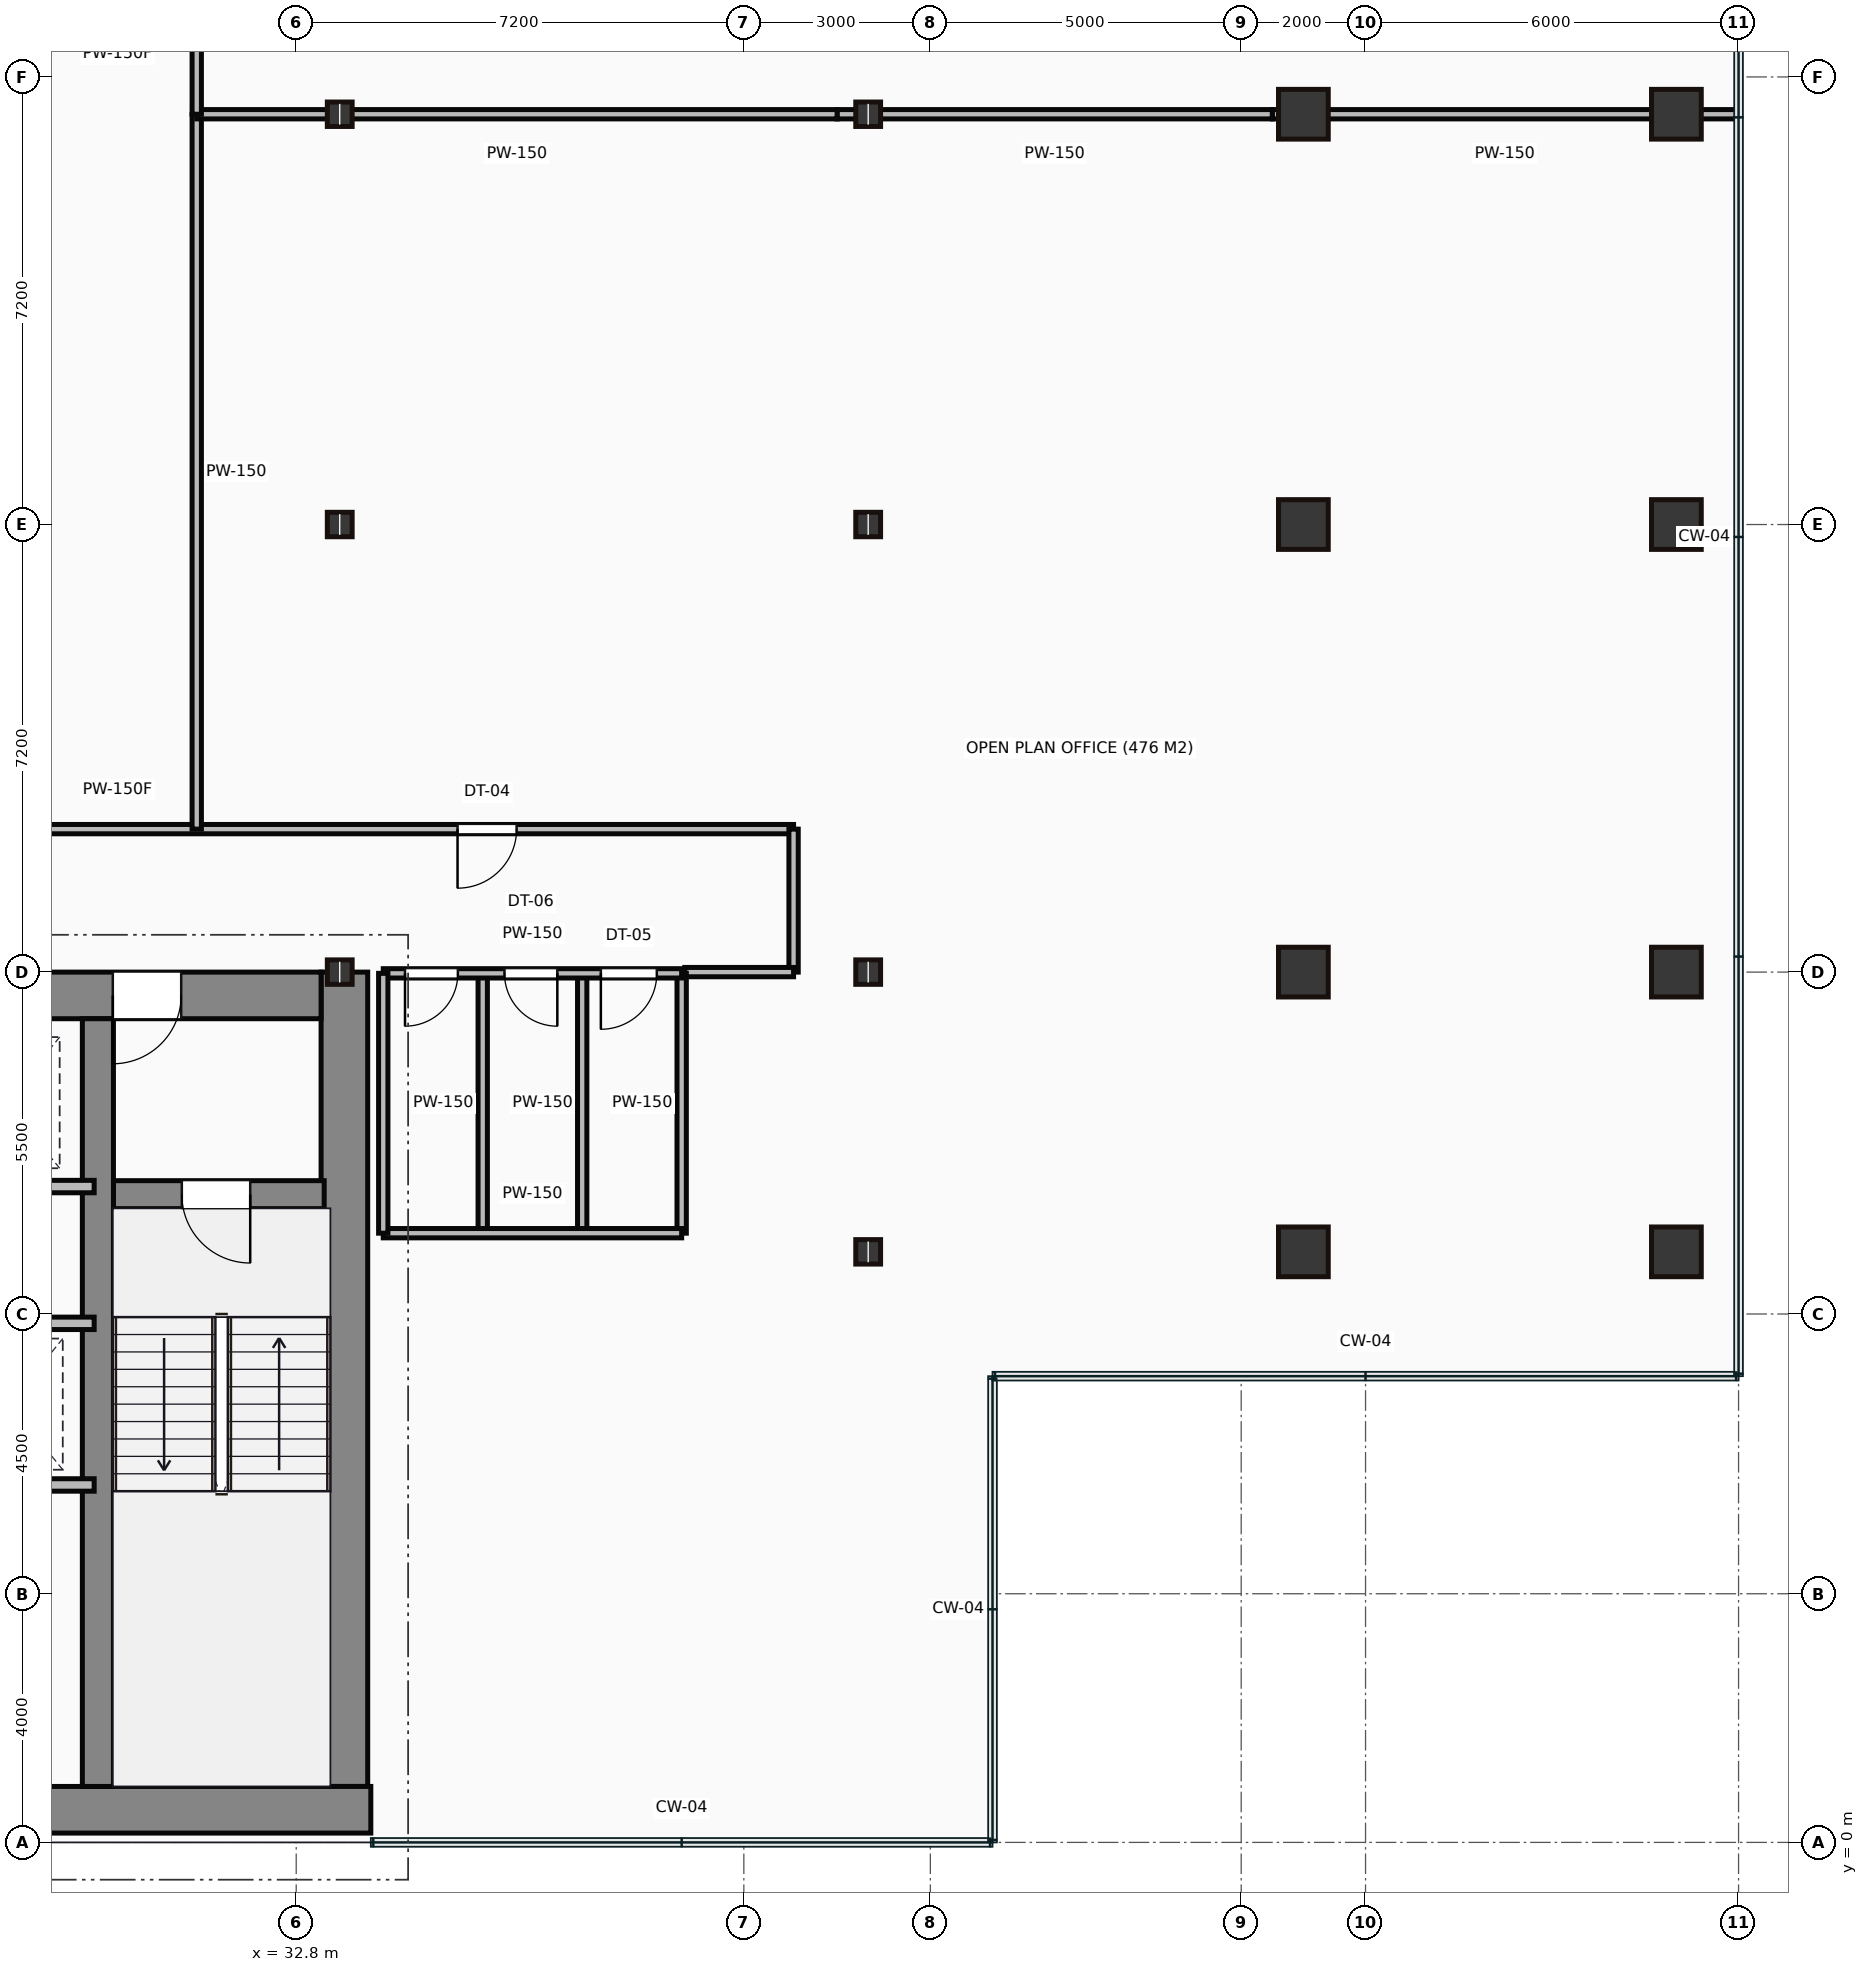
"""IFC4 building model, lengths in metres.
Left out: names, types, materials, properties, quantities, classifications, styles, units other than length and angle.
Written with IfcOpenShell. Run it as: python <this file> out.ifc"""

import sys

from ifc_helpers import new_model, si_unit, direction, frame, frame_2d, origin, origin_2d, place, context, subcontext, project, spatial, rectangle, hollow_rectangle, i_section, extrude, source, transform, mapped, element, fill, save


model = new_model("IFC4")
c1 = context("Model", 3, precision=1e-05, world=origin(), true_north=direction((0.0, 1.0)))
c2 = subcontext(c1, "Body", "Model", "MODEL_VIEW")
j1 = project(units=[si_unit("LENGTHUNIT", "METRE"), si_unit("PLANEANGLEUNIT", "RADIAN")], contexts=[c1])
p1 = place(None, origin())
s1 = spatial("IfcSite", under=j1, at=p1, CompositionType="ELEMENT")
p2 = place(p1, origin())
s2 = spatial("IfcBuilding", under=s1, at=p2, CompositionType="ELEMENT")
p3 = place(p2, frame((0.0, 0.0, 128.8)))
s3 = spatial("IfcBuildingStorey", under=s2, at=p3, CompositionType="ELEMENT", Elevation=128.8)
m1 = source(origin(), c2, "Body", "SweptSolid", [
    extrude(rectangle(XDim=29.5, YDim=0.75, at=frame_2d((14.75, 0.0))), origin(), (0.0, 0.0, 1.0), 3.65),
])
p4 = place(p3, frame((4.5, 0.525, 0.0), z_axis=(0.0, 0.0, 1.0), x_axis=(1.0, 0.0, 0.0)))
e1 = element("IfcWall", 1, at=p4, inside=s3, PredefinedType="SHEAR", context=c2, shape_type="MappedRepresentation", body=[
    mapped(m1, transform((0.0, 0.0, 0.0))),
])
m2 = source(origin(), c2, "Body", "SweptSolid", [
    extrude(rectangle(XDim=13.1, YDim=0.75, at=frame_2d((6.55, 0.0))), origin(), (0.0, 0.0, 1.0), 3.65),
])
p5 = place(p3, frame((33.575, 0.9, 0.0), z_axis=(0.0, 0.0, 1.0), x_axis=(0.0, 1.0, 0.0)))
e2 = element("IfcWall", 2, at=p5, inside=s3, PredefinedType="SHEAR", context=c2, shape_type="MappedRepresentation", body=[
    mapped(m2, transform((0.0, 0.0, 0.0))),
])
m3 = source(origin(), c2, "Body", "SweptSolid", [
    extrude(rectangle(XDim=12.6, YDim=0.75, at=frame_2d((6.3, 0.0))), origin(), (0.0, 0.0, 1.0), 3.65),
])
p6 = place(p3, frame((20.6, 13.625, 0.0), z_axis=(0.0, 0.0, 1.0), x_axis=(1.0, 0.0, 0.0)))
e3 = element("IfcWall", 3, at=p6, inside=s3, PredefinedType="SHEAR", context=c2, shape_type="MappedRepresentation", body=[
    mapped(m3, transform((0.0, 0.0, 0.0))),
])
p7 = place(p6, frame((9.25, 0.0, 0.0)))
e4 = element("IfcOpeningElement", 4, at=p7, cuts=e3, PredefinedType="OPENING", context=c2, shape_type="SweptSolid", body=[
    extrude(rectangle(XDim=1.1, YDim=2.15, at=frame_2d((0.55, 1.075))), frame((0.0, 0.385, 0.0), z_axis=(0.0, -1.0, 0.0), x_axis=(1.0, 0.0, 0.0)), (0.0, 0.0, 1.0), 0.77),
])
m4 = source(origin(), c2, "Body", "SweptSolid", [
    extrude(rectangle(XDim=12.35, YDim=0.5, at=frame_2d((6.175, 0.0))), origin(), (0.0, 0.0, 1.0), 3.65),
])
p8 = place(p3, frame((29.61, 0.9, 0.0), z_axis=(0.0, 0.0, 1.0), x_axis=(0.0, 1.0, 0.0)))
e5 = element("IfcWall", 5, at=p8, inside=s3, PredefinedType="SHEAR", context=c2, shape_type="MappedRepresentation", body=[
    mapped(m4, transform((0.0, 0.0, 0.0))),
])
m5 = source(origin(), c2, "Body", "SweptSolid", [
    extrude(rectangle(XDim=3.39, YDim=0.45, at=frame_2d((1.695, 0.0))), origin(), (0.0, 0.0, 1.0), 3.65),
])
p9 = place(p3, frame((29.86, 10.42, 0.0), z_axis=(0.0, 0.0, 1.0), x_axis=(1.0, 0.0, 0.0)))
e6 = element("IfcWall", 6, at=p9, inside=s3, PredefinedType="SHEAR", context=c2, shape_type="MappedRepresentation", body=[
    mapped(m5, transform((0.0, 0.0, 0.0))),
])
p10 = place(p9, frame((1.1, 0.0, 0.0)))
e7 = element("IfcOpeningElement", 7, at=p10, cuts=e6, PredefinedType="OPENING", context=c2, shape_type="SweptSolid", body=[
    extrude(rectangle(XDim=1.1, YDim=2.15, at=frame_2d((0.55, 1.075))), frame((0.0, 0.235, 0.0), z_axis=(0.0, -1.0, 0.0), x_axis=(1.0, 0.0, 0.0)), (0.0, 0.0, 1.0), 0.47),
])
m6 = source(origin(), c2, "Body", "SweptSolid", [
    extrude(i_section(OverallWidth=0.399, OverallDepth=0.393, WebThickness=0.023, FlangeThickness=0.037, at=origin_2d()), origin(), (0.0, 0.0, 1.0), 3.65),
])
for number, where, z_axis, x_axis in (
    (8, (33.5, 14.0, 0.0), (0.0, 0.0, 1.0), (1.0, 0.0, 0.0)),
    (9, (33.5, 21.2, 0.0), (0.0, 0.0, 1.0), (1.0, 0.0, 0.0)),
    (10, (33.5, 27.8, 0.0), (0.0, 0.0, 1.0), (1.0, 0.0, 0.0)),
    (11, (42.0, 9.5, 0.0), (0.0, 0.0, 1.0), (1.0, 0.0, 0.0)),
    (12, (42.0, 14.0, 0.0), (0.0, 0.0, 1.0), (1.0, 0.0, 0.0)),
    (13, (42.0, 21.2, 0.0), (0.0, 0.0, 1.0), (1.0, 0.0, 0.0)),
    (14, (42.0, 27.8, 0.0), (0.0, 0.0, 1.0), (1.0, 0.0, 0.0)),
):
    element("IfcColumn", number, at=place(p3, frame(where, z_axis=z_axis, x_axis=x_axis)), inside=s3, PredefinedType="COLUMN", context=c2, shape_type="MappedRepresentation", body=[
        mapped(m6, transform((0.0, 0.0, 0.0))),
    ])
m7 = source(origin(), c2, "Body", "SweptSolid", [
    extrude(hollow_rectangle(XDim=0.8, YDim=0.8, WallThickness=0.04, at=origin_2d()), origin(), (0.0, 0.0, 1.0), 3.65),
])
for number, where, z_axis, x_axis in (
    (15, (49.0, 9.5, 0.0), (0.0, 0.0, 1.0), (1.0, 0.0, 0.0)),
    (16, (49.0, 14.0, 0.0), (0.0, 0.0, 1.0), (1.0, 0.0, 0.0)),
    (17, (49.0, 21.2, 0.0), (0.0, 0.0, 1.0), (1.0, 0.0, 0.0)),
    (18, (49.0, 27.8, 0.0), (0.0, 0.0, 1.0), (1.0, 0.0, 0.0)),
    (19, (55.0, 9.5, 0.0), (0.0, 0.0, 1.0), (1.0, 0.0, 0.0)),
    (20, (55.0, 14.0, 0.0), (0.0, 0.0, 1.0), (1.0, 0.0, 0.0)),
    (21, (55.0, 21.2, 0.0), (0.0, 0.0, 1.0), (1.0, 0.0, 0.0)),
    (22, (55.0, 27.8, 0.0), (0.0, 0.0, 1.0), (1.0, 0.0, 0.0)),
):
    element("IfcColumn", number, at=place(p3, frame(where, z_axis=z_axis, x_axis=x_axis)), inside=s3, PredefinedType="COLUMN", context=c2, shape_type="MappedRepresentation", body=[
        mapped(m7, transform((0.0, 0.0, 0.0))),
    ])
m8 = source(origin(), c2, "Body", "SweptSolid", [
    extrude(rectangle(XDim=8.8, YDim=0.2, at=frame_2d((4.4, 0.0))), origin(), (0.0, 0.0, 1.0), 3.4),
])
p11 = place(p3, frame((20.75, 10.55, 0.0), z_axis=(0.0, 0.0, 1.0), x_axis=(1.0, 0.0, 0.0)))
e23 = element("IfcWall", 23, at=p11, inside=s3, PredefinedType="PARTITIONING", context=c2, shape_type="MappedRepresentation", body=[
    mapped(m8, transform((0.0, 0.0, 0.0))),
])
m9 = source(origin(), c2, "Body", "SweptSolid", [
    extrude(rectangle(XDim=4.55, YDim=0.2, at=frame_2d((2.275, 0.0))), origin(), (0.0, 0.0, 1.0), 3.4),
])
for number, where, z_axis, x_axis in (
    (24, (25.0, 8.35, 0.0), (0.0, 0.0, 1.0), (1.0, 0.0, 0.0)),
    (25, (25.0, 5.75, 0.0), (0.0, 0.0, 1.0), (1.0, 0.0, 0.0)),
):
    element("IfcWall", number, at=place(p3, frame(where, z_axis=z_axis, x_axis=x_axis)), inside=s3, PredefinedType="PARTITIONING", context=c2, shape_type="MappedRepresentation", body=[
        mapped(m9, transform((0.0, 0.0, 0.0))),
    ])
m10 = source(origin(), c2, "Body", "SweptSolid", [
    extrude(rectangle(XDim=4.8, YDim=0.15, at=frame_2d((2.4, 0.0))), origin(), (0.0, 0.0, 1.0), 2.702),
])
p12 = place(p3, frame((34.2, 13.98, 0.0), z_axis=(0.0, 0.0, 1.0), x_axis=(1.0, 0.0, 0.0)))
e26 = element("IfcWall", 26, at=p12, inside=s3, PredefinedType="PARTITIONING", context=c2, shape_type="MappedRepresentation", body=[
    mapped(m10, transform((0.0, 0.0, 0.0))),
])
p13 = place(p12, frame((0.35, 0.0, 0.0)))
e27 = element("IfcOpeningElement", 27, at=p13, cuts=e26, PredefinedType="OPENING", context=c2, shape_type="SweptSolid", body=[
    extrude(rectangle(XDim=0.85, YDim=2.1, at=frame_2d((0.425, 1.05))), frame((0.0, 0.085, 0.0), z_axis=(0.0, -1.0, 0.0), x_axis=(1.0, 0.0, 0.0)), (0.0, 0.0, 1.0), 0.17),
])
p14 = place(p12, frame((1.95, 0.0, 0.0)))
e28 = element("IfcOpeningElement", 28, at=p14, cuts=e26, PredefinedType="OPENING", context=c2, shape_type="SweptSolid", body=[
    extrude(rectangle(XDim=0.85, YDim=2.1, at=frame_2d((0.425, 1.05))), frame((0.0, 0.085, 0.0), z_axis=(0.0, -1.0, 0.0), x_axis=(1.0, 0.0, 0.0)), (0.0, 0.0, 1.0), 0.17),
])
p15 = place(p12, frame((3.5, 0.0, 0.0)))
e29 = element("IfcOpeningElement", 29, at=p15, cuts=e26, PredefinedType="OPENING", context=c2, shape_type="SweptSolid", body=[
    extrude(rectangle(XDim=0.9, YDim=2.1, at=frame_2d((0.45, 1.05))), frame((0.0, 0.085, 0.0), z_axis=(0.0, -1.0, 0.0), x_axis=(1.0, 0.0, 0.0)), (0.0, 0.0, 1.0), 0.17),
])
m11 = source(origin(), c2, "Body", "SweptSolid", [
    extrude(rectangle(XDim=4.8, YDim=0.15, at=frame_2d((2.4, 0.0))), origin(), (0.0, 0.0, 1.0), 3.4),
])
p16 = place(p3, frame((34.2, 9.8, 0.0), z_axis=(0.0, 0.0, 1.0), x_axis=(1.0, 0.0, 0.0)))
e30 = element("IfcWall", 30, at=p16, inside=s3, PredefinedType="PARTITIONING", context=c2, shape_type="MappedRepresentation", body=[
    mapped(m11, transform((0.0, 0.0, 0.0))),
])
m12 = source(origin(), c2, "Body", "SweptSolid", [
    extrude(rectangle(XDim=4.18, YDim=0.15, at=frame_2d((2.09, 0.0))), origin(), (0.0, 0.0, 1.0), 3.4),
])
for number, where, z_axis, x_axis in (
    (31, (39.0, 9.8, 0.0), (0.0, 0.0, 1.0), (0.0, 1.0, 0.0)),
    (32, (34.2, 9.8, 0.0), (0.0, 0.0, 1.0), (0.0, 1.0, 0.0)),
    (33, (35.8, 9.8, 0.0), (0.0, 0.0, 1.0), (0.0, 1.0, 0.0)),
    (34, (37.4, 9.8, 0.0), (0.0, 0.0, 1.0), (0.0, 1.0, 0.0)),
):
    element("IfcWall", number, at=place(p3, frame(where, z_axis=z_axis, x_axis=x_axis)), inside=s3, PredefinedType="PARTITIONING", context=c2, shape_type="MappedRepresentation", body=[
        mapped(m12, transform((0.0, 0.0, 0.0))),
    ])
m13 = source(origin(), c2, "Body", "SweptSolid", [
    extrude(rectangle(XDim=21.75, YDim=0.15, at=frame_2d((10.875, 0.0))), origin(), (0.0, 0.0, 1.0), 3.4),
])
p17 = place(p3, frame((19.05, 16.3, 0.0), z_axis=(0.0, 0.0, 1.0), x_axis=(1.0, 0.0, 0.0)))
e35 = element("IfcWall", 35, at=p17, inside=s3, PredefinedType="PARTITIONING", context=c2, shape_type="MappedRepresentation", body=[
    mapped(m13, transform((0.0, 0.0, 0.0))),
])
p18 = place(p17, frame((16.345, 0.0, 0.0)))
e36 = element("IfcOpeningElement", 36, at=p18, cuts=e35, PredefinedType="OPENING", context=c2, shape_type="SweptSolid", body=[
    extrude(rectangle(XDim=0.95, YDim=2.15, at=frame_2d((0.475, 1.075))), frame((0.0, 0.085, 0.0), z_axis=(0.0, -1.0, 0.0), x_axis=(1.0, 0.0, 0.0)), (0.0, 0.0, 1.0), 0.17),
])
m14 = source(origin(), c2, "Body", "SweptSolid", [
    extrude(rectangle(XDim=2.3, YDim=0.15, at=frame_2d((1.15, 0.0))), origin(), (0.0, 0.0, 1.0), 3.4),
])
p19 = place(p3, frame((40.8, 16.3, 0.0), z_axis=(0.0, 0.0, 1.0), x_axis=(0.0, -1.0, 0.0)))
e37 = element("IfcWall", 37, at=p19, inside=s3, PredefinedType="PARTITIONING", context=c2, shape_type="MappedRepresentation", body=[
    mapped(m14, transform((0.0, 0.0, 0.0))),
])
m15 = source(origin(), c2, "Body", "SweptSolid", [
    extrude(rectangle(XDim=1.75, YDim=0.15, at=frame_2d((0.875, 0.0))), origin(), (0.0, 0.0, 1.0), 2.702),
])
p20 = place(p3, frame((40.8, 14.0, 0.0), z_axis=(0.0, 0.0, 1.0), x_axis=(-1.0, 0.0, 0.0)))
e38 = element("IfcWall", 38, at=p20, inside=s3, PredefinedType="PARTITIONING", context=c2, shape_type="MappedRepresentation", body=[
    mapped(m15, transform((0.0, 0.0, 0.0))),
])
m16 = source(origin(), c2, "Body", "SweptSolid", [
    extrude(rectangle(XDim=11.5, YDim=0.15, at=frame_2d((5.75, 0.0))), origin(), (0.0, 0.0, 1.0), 3.4),
])
p21 = place(p3, frame((31.2, 27.8, 0.0), z_axis=(0.0, 0.0, 1.0), x_axis=(0.0, -1.0, 0.0)))
e39 = element("IfcWall", 39, at=p21, inside=s3, PredefinedType="PARTITIONING", context=c2, shape_type="MappedRepresentation", body=[
    mapped(m16, transform((0.0, 0.0, 0.0))),
])
m17 = source(origin(), c2, "Body", "SweptSolid", [
    extrude(rectangle(XDim=7.48, YDim=0.15, at=frame_2d((3.74, 0.0))), origin(), (0.0, 0.0, 1.0), 2.702),
])
p22 = place(p3, frame((55.98, 27.8, 0.0), z_axis=(0.0, 0.0, 1.0), x_axis=(-1.0, 0.0, 0.0)))
e40 = element("IfcWall", 40, at=p22, inside=s3, PredefinedType="PARTITIONING", context=c2, shape_type="MappedRepresentation", body=[
    mapped(m17, transform((0.0, 0.0, 0.0))),
])
m18 = source(origin(), c2, "Body", "SweptSolid", [
    extrude(rectangle(XDim=7.0, YDim=0.15, at=frame_2d((3.5, 0.0))), origin(), (0.0, 0.0, 1.0), 2.702),
])
p23 = place(p3, frame((48.5, 27.8, 0.0), z_axis=(0.0, 0.0, 1.0), x_axis=(-1.0, 0.0, 0.0)))
e41 = element("IfcWall", 41, at=p23, inside=s3, PredefinedType="PARTITIONING", context=c2, shape_type="MappedRepresentation", body=[
    mapped(m18, transform((0.0, 0.0, 0.0))),
])
m19 = source(origin(), c2, "Body", "SweptSolid", [
    extrude(rectangle(XDim=10.3, YDim=0.15, at=frame_2d((5.15, 0.0))), origin(), (0.0, 0.0, 1.0), 2.702),
])
p24 = place(p3, frame((41.5, 27.8, 0.0), z_axis=(0.0, 0.0, 1.0), x_axis=(-1.0, 0.0, 0.0)))
e42 = element("IfcWall", 42, at=p24, inside=s3, PredefinedType="PARTITIONING", context=c2, shape_type="MappedRepresentation", body=[
    mapped(m19, transform((0.0, 0.0, 0.0))),
])
m20 = source(origin(), c2, "Body", "SweptSolid", [
    extrude(rectangle(XDim=1.6, YDim=0.15, at=frame_2d((0.8, 0.0))), origin(), (0.0, 0.0, 1.0), 3.4),
])
p25 = place(p3, frame((31.2, 29.4, 0.0), z_axis=(0.0, 0.0, 1.0), x_axis=(0.0, -1.0, 0.0)))
e43 = element("IfcWall", 43, at=p25, inside=s3, PredefinedType="PARTITIONING", context=c2, shape_type="MappedRepresentation", body=[
    mapped(m20, transform((0.0, 0.0, 0.0))),
])
m21 = source(origin(), c2, "Body", "SweptSolid", [
    extrude(rectangle(XDim=1.1, YDim=2.15, at=frame_2d((0.55, 1.075))), frame((0.0, 0.025, 0.0), z_axis=(0.0, -1.0, 0.0), x_axis=(1.0, 0.0, 0.0)), (0.0, 0.0, 1.0), 0.05),
])
p26 = place(p10, frame((1.1, 0.0, 0.0), z_axis=(0.0, 0.0, 1.0), x_axis=(-1.0, 0.0, 0.0)))
e44 = element("IfcDoor", 44, at=p26, inside=s3, OperationType="SINGLE_SWING_RIGHT", PredefinedType="DOOR", context=c2, shape_type="MappedRepresentation", body=[
    mapped(m21, transform((0.0, 0.0, 0.0))),
])
fill(e7, e44)
p27 = place(p7, origin())
e45 = element("IfcDoor", 45, at=p27, inside=s3, OperationType="SINGLE_SWING_LEFT", PredefinedType="DOOR", context=c2, shape_type="MappedRepresentation", body=[
    mapped(m21, transform((0.0, 0.0, 0.0))),
])
fill(e4, e45)
m22 = source(origin(), c2, "Body", "SweptSolid", [
    extrude(rectangle(XDim=0.85, YDim=2.1, at=frame_2d((0.425, 1.05))), frame((0.0, 0.025, 0.0), z_axis=(0.0, -1.0, 0.0), x_axis=(1.0, 0.0, 0.0)), (0.0, 0.0, 1.0), 0.05),
])
p28 = place(p13, frame((0.85, 0.0, 0.0), z_axis=(0.0, 0.0, 1.0), x_axis=(-1.0, 0.0, 0.0)))
e46 = element("IfcDoor", 46, at=p28, inside=s3, OperationType="SINGLE_SWING_LEFT", PredefinedType="DOOR", context=c2, shape_type="MappedRepresentation", body=[
    mapped(m22, transform((0.0, 0.0, 0.0))),
])
fill(e27, e46)
p29 = place(p14, frame((0.85, 0.0, 0.0), z_axis=(0.0, 0.0, 1.0), x_axis=(-1.0, 0.0, 0.0)))
e47 = element("IfcDoor", 47, at=p29, inside=s3, OperationType="SINGLE_SWING_RIGHT", PredefinedType="DOOR", context=c2, shape_type="MappedRepresentation", body=[
    mapped(m22, transform((0.0, 0.0, 0.0))),
])
fill(e28, e47)
m23 = source(origin(), c2, "Body", "SweptSolid", [
    extrude(rectangle(XDim=0.9, YDim=2.1, at=frame_2d((0.45, 1.05))), frame((0.0, 0.025, 0.0), z_axis=(0.0, -1.0, 0.0), x_axis=(1.0, 0.0, 0.0)), (0.0, 0.0, 1.0), 0.05),
])
p30 = place(p15, frame((0.9, 0.0, 0.0), z_axis=(0.0, 0.0, 1.0), x_axis=(-1.0, 0.0, 0.0)))
e48 = element("IfcDoor", 48, at=p30, inside=s3, OperationType="SINGLE_SWING_LEFT", PredefinedType="DOOR", context=c2, shape_type="MappedRepresentation", body=[
    mapped(m23, transform((0.0, 0.0, 0.0))),
])
fill(e29, e48)
m24 = source(origin(), c2, "Body", "SweptSolid", [
    extrude(rectangle(XDim=0.95, YDim=2.15, at=frame_2d((0.475, 1.075))), frame((0.0, 0.025, 0.0), z_axis=(0.0, -1.0, 0.0), x_axis=(1.0, 0.0, 0.0)), (0.0, 0.0, 1.0), 0.05),
])
p31 = place(p18, origin())
e49 = element("IfcDoor", 49, at=p31, inside=s3, OperationType="SINGLE_SWING_LEFT", PredefinedType="DOOR", context=c2, shape_type="MappedRepresentation", body=[
    mapped(m24, transform((0.0, 0.0, 0.0))),
])
fill(e36, e49)
save(model, sys.argv[1])
